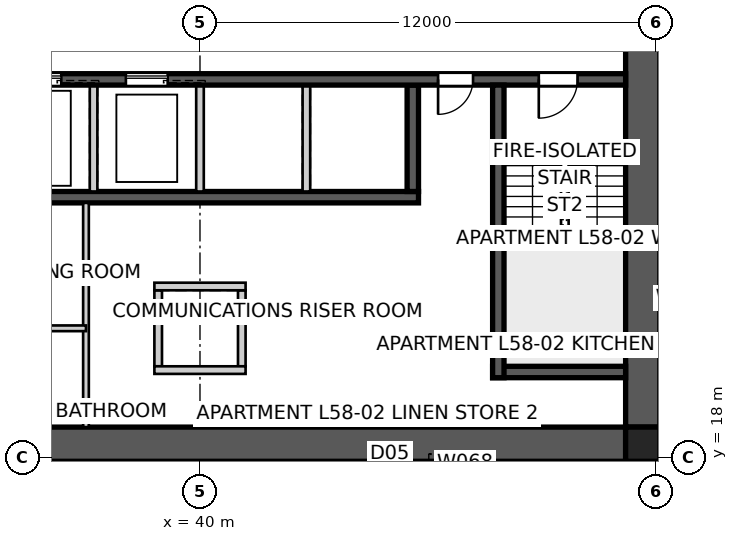
"""IFC4 building model, lengths in metres.
Left out: names, types, materials, properties, quantities, classifications, styles, units other than length and angle.
Written with IfcOpenShell. Run it as: python <this file> out.ifc"""

import sys

from ifc_helpers import new_model, si_unit, direction, frame, frame_2d, origin, origin_2d, place, context, subcontext, project, spatial, polyline, rectangle, outline, extrude, element, fill, save


model = new_model("IFC4")
c1 = context("Model", 3, precision=1e-05, world=origin(), true_north=direction((0.0, 1.0)))
c2 = subcontext(c1, "Body", "Model", "MODEL_VIEW")
j1 = project(units=[si_unit("LENGTHUNIT", "METRE"), si_unit("PLANEANGLEUNIT", "RADIAN")], contexts=[c1])
p1 = place(None, origin())
s1 = spatial("IfcSite", under=j1, at=p1, CompositionType="ELEMENT")
p2 = place(p1, origin())
s2 = spatial("IfcBuilding", under=s1, at=p2, CompositionType="ELEMENT")
p3 = place(p2, frame((0.0, 0.0, 211.6)))
s3 = spatial("IfcBuildingStorey", under=s2, at=p3, CompositionType="ELEMENT", Elevation=211.6)
p4 = place(p3, frame((51.2, 18.35, 0.0), z_axis=(0.0, 0.0, 1.0), x_axis=(-1.0, 0.0, 0.0)))
e1 = element("IfcWall", 1, at=p4, inside=s3, PredefinedType="SHEAR", context=c2, shape_type="SweptSolid", body=[
    extrude(outline(polyline([(0.0, -0.45), (22.4, -0.45), (22.4, -0.025), (22.85, -0.025), (22.85, 0.025), (22.4, 0.025), (22.4, 0.45), (0.0, 0.45), (0.0, 0.025), (-0.45, 0.025), (-0.45, -0.025), (0.0, -0.025), (0.0, -0.45)])), origin(), (0.0, 0.0, 1.0), 3.4),
])
p5 = place(p3, frame((51.65, 18.8, 0.0), z_axis=(0.0, 0.0, 1.0), x_axis=(0.0, 1.0, 0.0)))
e2 = element("IfcWall", 2, at=p5, inside=s3, PredefinedType="SHEAR", context=c2, shape_type="SweptSolid", body=[
    extrude(outline(polyline([(0.0, -0.45), (22.4, -0.45), (22.4, -0.025), (22.85, -0.025), (22.85, 0.025), (22.4, 0.025), (22.4, 0.45), (0.0, 0.45), (0.0, 0.025), (-0.45, 0.025), (-0.45, -0.025), (0.0, -0.025), (0.0, -0.45)])), origin(), (0.0, 0.0, 1.0), 3.4),
])
p6 = place(p5, frame((11.14, 0.0, 0.0)))
e3 = element("IfcOpeningElement", 3, at=p6, cuts=e2, PredefinedType="OPENING", context=c2, shape_type="SweptSolid", body=[
    extrude(rectangle(XDim=1.02, YDim=2.4, at=frame_2d((0.51, 1.2))), frame((0.0, 0.46, 0.0), z_axis=(0.0, -1.0, 0.0), x_axis=(1.0, 0.0, 0.0)), (0.0, 0.0, 1.0), 0.92),
])
p7 = place(p3, frame((51.2, 27.95, 0.0), z_axis=(0.0, 0.0, 1.0), x_axis=(-1.0, 0.0, 0.0)))
e4 = element("IfcWall", 4, at=p7, inside=s3, PredefinedType="SHEAR", context=c2, shape_type="SweptSolid", body=[
    extrude(rectangle(XDim=22.4, YDim=0.3, at=frame_2d((11.2, 0.0))), origin(), (0.0, 0.0, 1.0), 3.4),
])
p8 = place(p7, frame((19.04, 0.0, 0.0)))
e5 = element("IfcOpeningElement", 5, at=p8, cuts=e4, PredefinedType="OPENING", context=c2, shape_type="SweptSolid", body=[
    extrude(rectangle(XDim=0.92, YDim=2.1, at=frame_2d((0.46, 1.05))), frame((0.0, 0.16, 0.0), z_axis=(0.0, -1.0, 0.0), x_axis=(1.0, 0.0, 0.0)), (0.0, 0.0, 1.0), 0.32),
])
p9 = place(p7, frame((1.265, 0.0, 0.0)))
e6 = element("IfcOpeningElement", 6, at=p9, cuts=e4, PredefinedType="OPENING", context=c2, shape_type="SweptSolid", body=[
    extrude(rectangle(XDim=1.02, YDim=2.1, at=frame_2d((0.51, 1.05))), frame((0.0, 0.16, 0.0), z_axis=(0.0, -1.0, 0.0), x_axis=(1.0, 0.0, 0.0)), (0.0, 0.0, 1.0), 0.32),
])
p10 = place(p7, frame((4.015, 0.0, 0.0)))
e7 = element("IfcOpeningElement", 7, at=p10, cuts=e4, PredefinedType="OPENING", context=c2, shape_type="SweptSolid", body=[
    extrude(rectangle(XDim=0.92, YDim=2.1, at=frame_2d((0.46, 1.05))), frame((0.0, 0.16, 0.0), z_axis=(0.0, -1.0, 0.0), x_axis=(1.0, 0.0, 0.0)), (0.0, 0.0, 1.0), 0.32),
])
p11 = place(p7, frame((12.05, 0.0, 0.0)))
e8 = element("IfcOpeningElement", 8, at=p11, cuts=e4, PredefinedType="OPENING", context=c2, shape_type="SweptSolid", body=[
    extrude(rectangle(XDim=1.1, YDim=2.1, at=frame_2d((0.55, 1.05))), frame((0.0, 0.16, 0.0), z_axis=(0.0, -1.0, 0.0), x_axis=(1.0, 0.0, 0.0)), (0.0, 0.0, 1.0), 0.32),
])
p12 = place(p7, frame((14.85, 0.0, 0.0)))
e9 = element("IfcOpeningElement", 9, at=p12, cuts=e4, PredefinedType="OPENING", context=c2, shape_type="SweptSolid", body=[
    extrude(rectangle(XDim=1.1, YDim=2.1, at=frame_2d((0.55, 1.05))), frame((0.0, 0.16, 0.0), z_axis=(0.0, -1.0, 0.0), x_axis=(1.0, 0.0, 0.0)), (0.0, 0.0, 1.0), 0.32),
])
p13 = place(p3, frame((45.75, 24.85, 0.0), z_axis=(0.0, 0.0, 1.0), x_axis=(-1.0, 0.0, 0.0)))
e10 = element("IfcWall", 10, at=p13, inside=s3, PredefinedType="SHEAR", context=c2, shape_type="SweptSolid", body=[
    extrude(rectangle(XDim=11.5, YDim=0.3, at=frame_2d((5.75, 0.0))), origin(), (0.0, 0.0, 1.0), 3.4),
])
p14 = place(p3, frame((45.6, 27.8, 0.0), z_axis=(0.0, 0.0, 1.0), x_axis=(0.0, -1.0, 0.0)))
e11 = element("IfcWall", 11, at=p14, inside=s3, PredefinedType="SHEAR", context=c2, shape_type="SweptSolid", body=[
    extrude(rectangle(XDim=2.8, YDim=0.3, at=frame_2d((1.4, 0.0))), origin(), (0.0, 0.0, 1.0), 3.4),
])
for number, where, z_axis, x_axis in (
    (12, (42.8, 27.8, 0.0), (0.0, 0.0, 1.0), (0.0, -1.0, 0.0)),
    (13, (40.0, 27.8, 0.0), (0.0, 0.0, 1.0), (0.0, -1.0, 0.0)),
    (14, (37.2, 27.8, 0.0), (0.0, 0.0, 1.0), (0.0, -1.0, 0.0)),
):
    element("IfcWall", number, at=place(p3, frame(where, z_axis=z_axis, x_axis=x_axis)), inside=s3, PredefinedType="SOLIDWALL", context=c2, shape_type="SweptSolid", body=[
        extrude(rectangle(XDim=2.8, YDim=0.2, at=frame_2d((1.4, 0.0))), origin(), (0.0, 0.0, 1.0), 3.4),
    ])
p15 = place(p3, frame((47.85, 27.8, 0.0), z_axis=(0.0, 0.0, 1.0), x_axis=(0.0, -1.0, 0.0)))
e15 = element("IfcWall", 15, at=p15, inside=s3, PredefinedType="SHEAR", context=c2, shape_type="SweptSolid", body=[
    extrude(rectangle(XDim=7.7, YDim=0.3, at=frame_2d((3.85, 0.0))), origin(), (0.0, 0.0, 1.0), 3.4),
])
p16 = place(p3, frame((51.2, 20.25, 0.0), z_axis=(0.0, 0.0, 1.0), x_axis=(-1.0, 0.0, 0.0)))
e16 = element("IfcWall", 16, at=p16, inside=s3, PredefinedType="SHEAR", context=c2, shape_type="SweptSolid", body=[
    extrude(rectangle(XDim=3.5, YDim=0.3, at=frame_2d((1.75, 0.0))), origin(), (0.0, 0.0, 1.0), 3.4),
])
for number, where, z_axis, x_axis in (
    (17, (38.9, 22.4, 0.0), (0.0, 0.0, 1.0), (0.0, -1.0, 0.0)),
    (18, (41.1, 22.4, 0.0), (0.0, 0.0, 1.0), (0.0, -1.0, 0.0)),
):
    element("IfcWall", number, at=place(p3, frame(where, z_axis=z_axis, x_axis=x_axis)), inside=s3, PredefinedType="SOLIDWALL", context=c2, shape_type="SweptSolid", body=[
        extrude(rectangle(XDim=2.0, YDim=0.2, at=frame_2d((1.0, 0.0))), origin(), (0.0, 0.0, 1.0), 3.4),
    ])
for number, where, z_axis, x_axis in (
    (19, (38.8, 22.5, 0.0), (0.0, 0.0, 1.0), (1.0, 0.0, 0.0)),
    (20, (38.8, 20.3, 0.0), (0.0, 0.0, 1.0), (1.0, 0.0, 0.0)),
):
    element("IfcWall", number, at=place(p3, frame(where, z_axis=z_axis, x_axis=x_axis)), inside=s3, PredefinedType="SOLIDWALL", context=c2, shape_type="SweptSolid", body=[
        extrude(rectangle(XDim=2.4, YDim=0.2, at=frame_2d((1.2, 0.0))), origin(), (0.0, 0.0, 1.0), 3.4),
    ])
p17 = place(p3, frame((51.65, 18.35, 0.0), z_axis=(0.0, 0.0, 1.0), x_axis=(1.0, 0.0, 0.0)))
e21 = element("IfcColumn", 21, at=p17, inside=s3, PredefinedType="COLUMN", context=c2, shape_type="SweptSolid", body=[
    extrude(rectangle(XDim=0.9, YDim=0.9, at=origin_2d()), origin(), (0.0, 0.0, 1.0), 3.4),
])
p18 = place(p3, frame((37.0, 18.8, 0.0), z_axis=(0.0, 0.0, 1.0), x_axis=(0.0, 1.0, 0.0)))
e22 = element("IfcWall", 22, at=p18, inside=s3, PredefinedType="SOLIDWALL", context=c2, shape_type="SweptSolid", body=[
    extrude(rectangle(XDim=5.9, YDim=0.15, at=frame_2d((2.95, 0.0))), origin(), (0.0, 0.0, 1.0), 3.25),
])
p19 = place(p3, frame((37.0, 21.4, 0.0), z_axis=(0.0, 0.0, 1.0), x_axis=(-1.0, 0.0, 0.0)))
e23 = element("IfcWall", 23, at=p19, inside=s3, PredefinedType="SOLIDWALL", context=c2, shape_type="SweptSolid", body=[
    extrude(rectangle(XDim=8.2, YDim=0.15, at=frame_2d((4.1, 0.0))), origin(), (0.0, 0.0, 1.0), 3.25),
])
p20 = place(p19, frame((3.64, 0.0, 0.0)))
e24 = element("IfcOpeningElement", 24, at=p20, cuts=e23, PredefinedType="OPENING", context=c2, shape_type="SweptSolid", body=[
    extrude(rectangle(XDim=0.92, YDim=2.1, at=frame_2d((0.46, 1.05))), frame((0.0, 0.085, 0.0), z_axis=(0.0, -1.0, 0.0), x_axis=(1.0, 0.0, 0.0)), (0.0, 0.0, 1.0), 0.17),
])
p21 = place(p9, origin())
e25 = element("IfcDoor", 25, at=p21, inside=s3, OperationType="SINGLE_SWING_RIGHT", PredefinedType="DOOR", context=c2, shape_type="SweptSolid", body=[
    extrude(rectangle(XDim=1.02, YDim=2.1, at=frame_2d((0.51, 1.05))), frame((0.0, 0.025, 0.0), z_axis=(0.0, -1.0, 0.0), x_axis=(1.0, 0.0, 0.0)), (0.0, 0.0, 1.0), 0.05),
])
fill(e6, e25)
p22 = place(p10, origin())
e26 = element("IfcDoor", 26, at=p22, inside=s3, OperationType="SINGLE_SWING_RIGHT", PredefinedType="DOOR", context=c2, shape_type="SweptSolid", body=[
    extrude(rectangle(XDim=0.92, YDim=2.1, at=frame_2d((0.46, 1.05))), frame((0.0, 0.025, 0.0), z_axis=(0.0, -1.0, 0.0), x_axis=(1.0, 0.0, 0.0)), (0.0, 0.0, 1.0), 0.05),
])
fill(e7, e26)
p23 = place(p11, origin())
e27 = element("IfcDoor", 27, at=p23, inside=s3, OperationType="SLIDING_TO_LEFT", PredefinedType="DOOR", context=c2, shape_type="SweptSolid", body=[
    extrude(rectangle(XDim=1.1, YDim=2.1, at=frame_2d((0.55, 1.05))), frame((0.0, 0.025, 0.0), z_axis=(0.0, -1.0, 0.0), x_axis=(1.0, 0.0, 0.0)), (0.0, 0.0, 1.0), 0.05),
])
fill(e8, e27)
p24 = place(p12, origin())
e28 = element("IfcDoor", 28, at=p24, inside=s3, OperationType="SLIDING_TO_LEFT", PredefinedType="DOOR", context=c2, shape_type="SweptSolid", body=[
    extrude(rectangle(XDim=1.1, YDim=2.1, at=frame_2d((0.55, 1.05))), frame((0.0, 0.025, 0.0), z_axis=(0.0, -1.0, 0.0), x_axis=(1.0, 0.0, 0.0)), (0.0, 0.0, 1.0), 0.05),
])
fill(e9, e28)
save(model, sys.argv[1])
